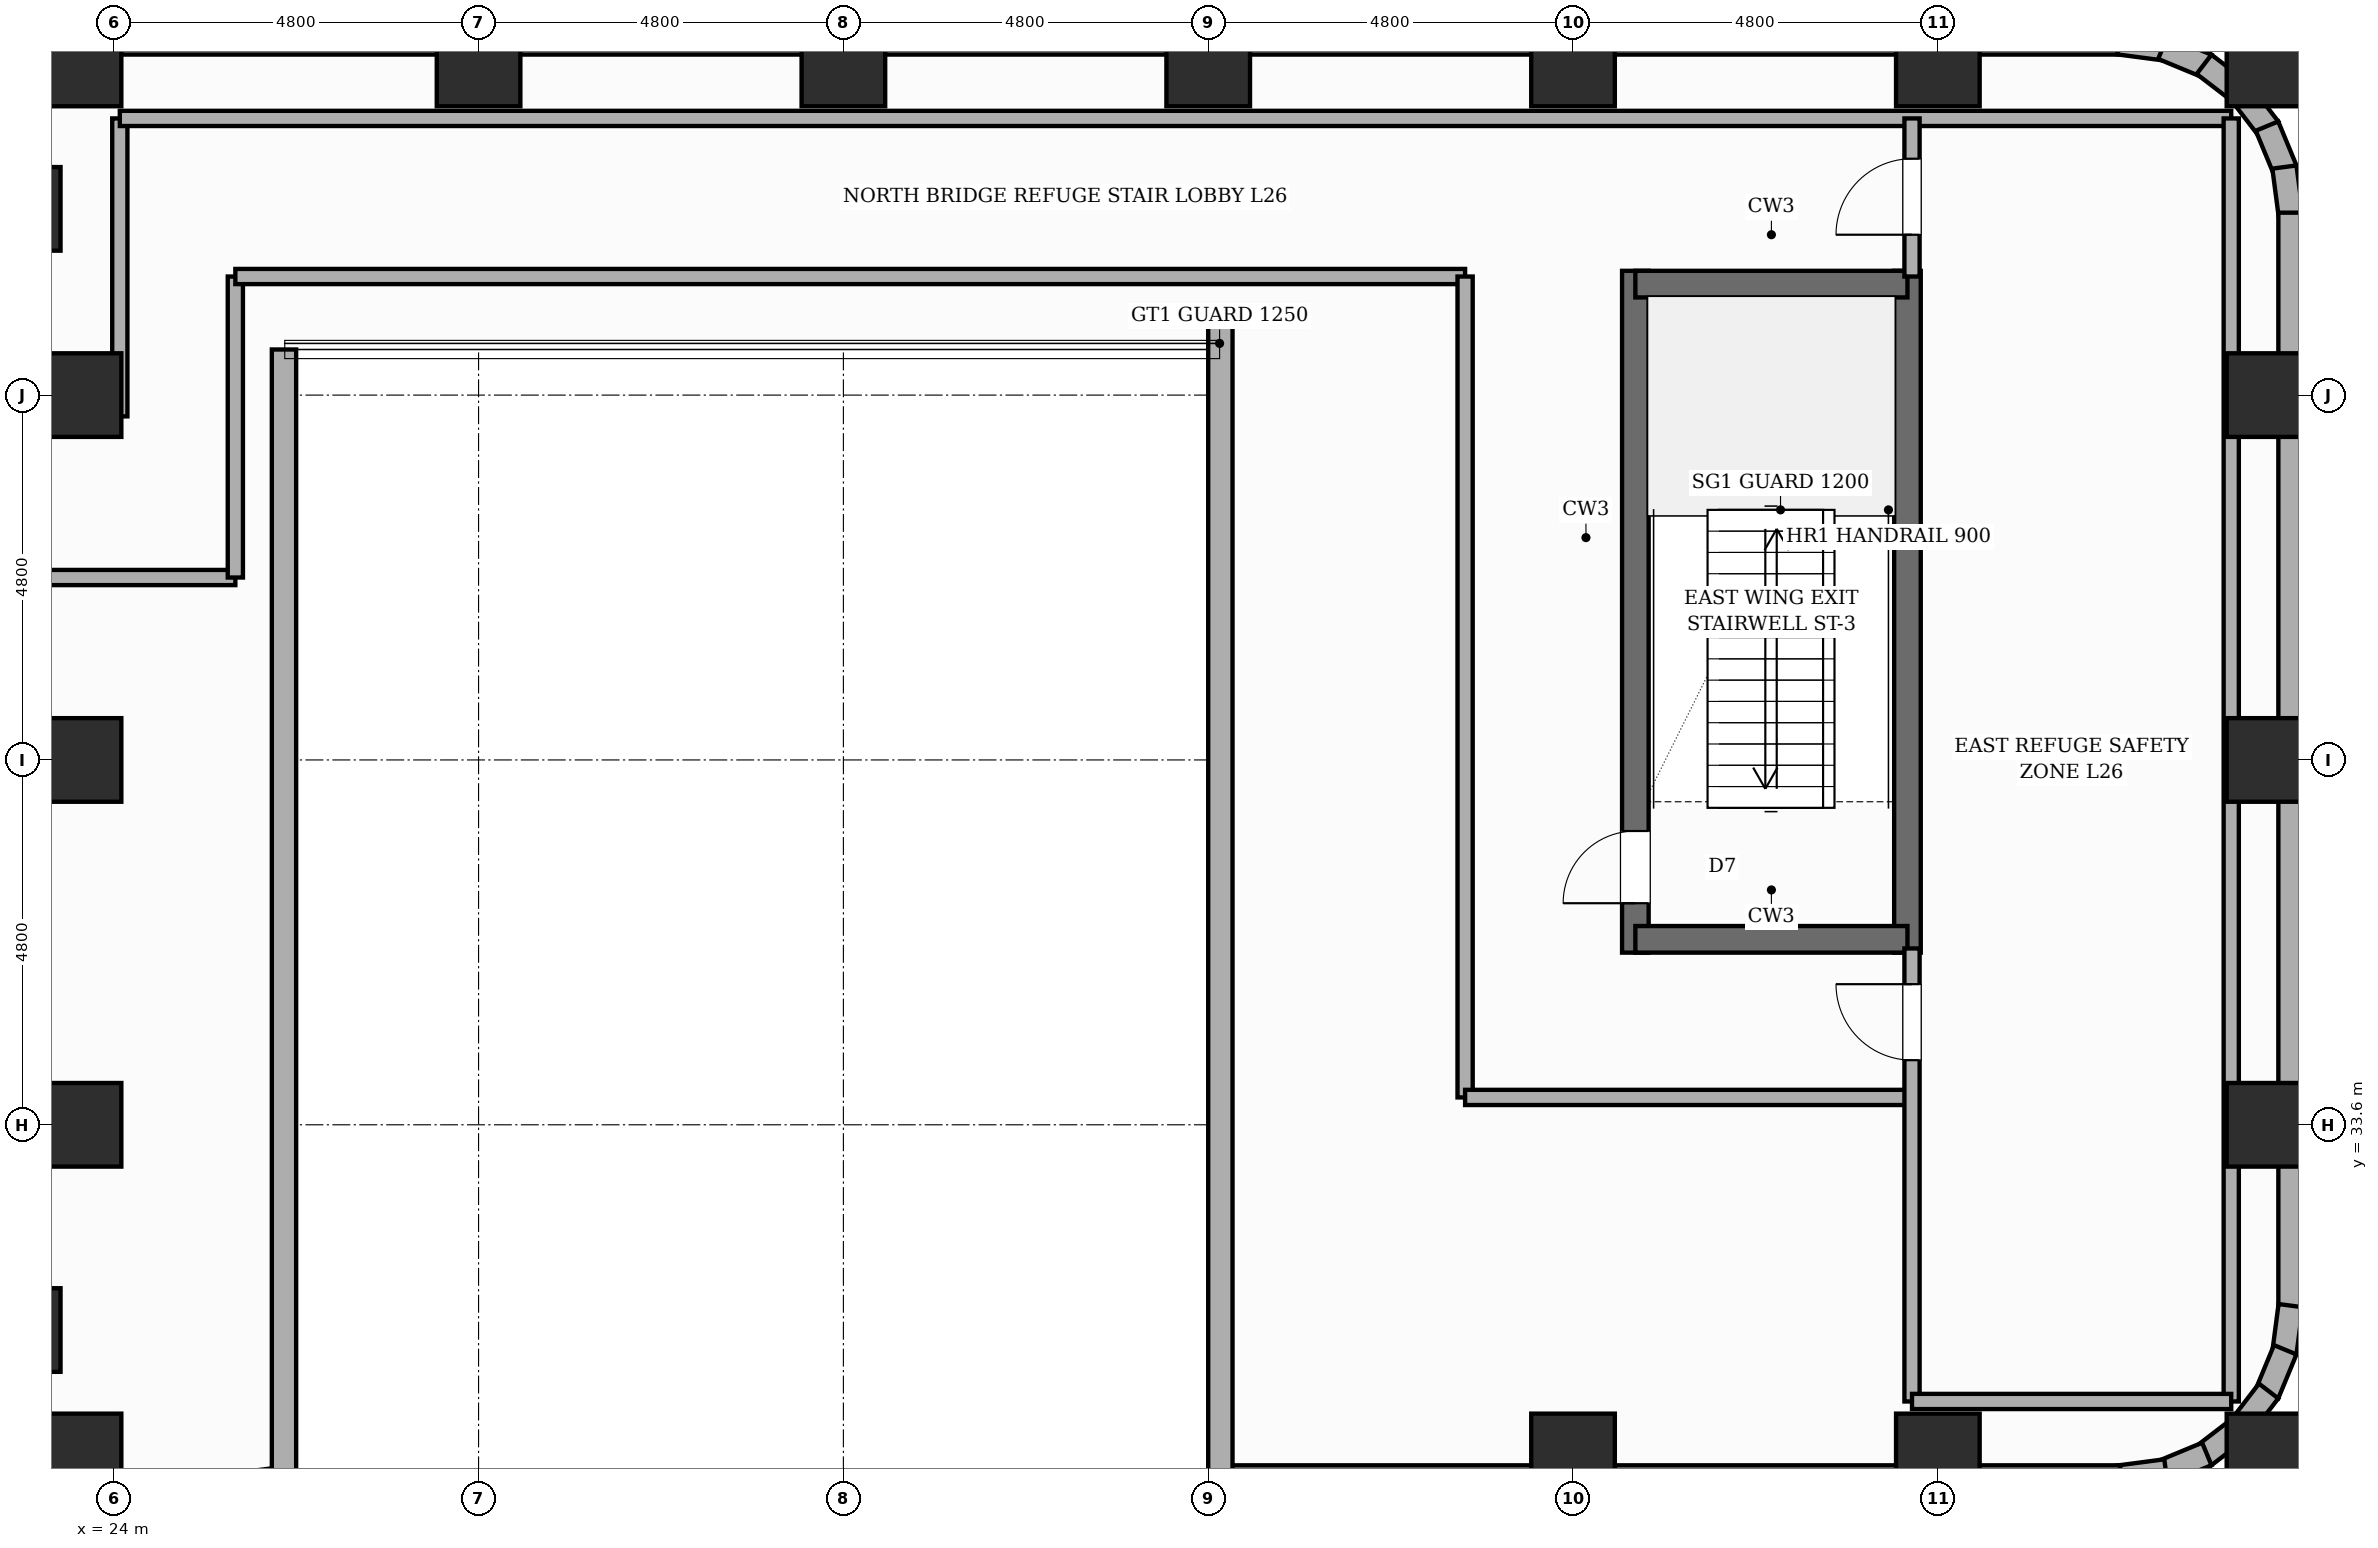
"""IFC4 building model, lengths in metres.
Left out: names, types, materials, properties, quantities, classifications, styles, units other than length and angle.
Written with IfcOpenShell. Run it as: python <this file> out.ifc"""

import sys

from ifc_helpers import new_model, si_unit, direction, frame, frame_2d, origin, origin_2d, place, context, subcontext, project, spatial, rectangle, extrude, element, fill, save


model = new_model("IFC4")
c1 = context("Model", 3, precision=1e-05, world=origin(), true_north=direction((0.0, 1.0)))
c2 = subcontext(c1, "Body", "Model", "MODEL_VIEW")
j1 = project(units=[si_unit("LENGTHUNIT", "METRE"), si_unit("PLANEANGLEUNIT", "RADIAN")], contexts=[c1])
p1 = place(None, origin())
s1 = spatial("IfcSite", under=j1, at=p1, CompositionType="ELEMENT")
p2 = place(p1, origin())
s2 = spatial("IfcBuilding", under=s1, at=p2, CompositionType="ELEMENT")
p3 = place(p2, frame((0.0, 0.0, 101.8)))
s3 = spatial("IfcBuildingStorey", under=s2, at=p3, CompositionType="ELEMENT", Elevation=101.8)
p4 = place(p3, frame((44.02, 35.865, 0.0), z_axis=(0.0, 0.0, 1.0), x_axis=(0.0, 1.0, 0.0)))
e1 = element("IfcWall", 1, at=p4, inside=s3, PredefinedType="SHEAR", context=c2, shape_type="SweptSolid", body=[
    extrude(rectangle(XDim=8.97, YDim=0.35, at=frame_2d((4.485, 0.0))), origin(), (0.0, 0.0, 1.0), 5.4),
])
p5 = place(p4, frame((0.65, 0.0, 0.0)))
e2 = element("IfcOpeningElement", 2, at=p5, cuts=e1, PredefinedType="OPENING", context=c2, shape_type="SweptSolid", body=[
    extrude(rectangle(XDim=0.95, YDim=2.1, at=frame_2d((0.475, 1.05))), frame((0.0, 0.185, 0.0), z_axis=(0.0, -1.0, 0.0), x_axis=(1.0, 0.0, 0.0)), (0.0, 0.0, 1.0), 0.37),
])
p6 = place(p3, frame((47.6, 35.865, 0.0), z_axis=(0.0, 0.0, 1.0), x_axis=(0.0, 1.0, 0.0)))
e3 = element("IfcWall", 3, at=p6, inside=s3, PredefinedType="SHEAR", context=c2, shape_type="SweptSolid", body=[
    extrude(rectangle(XDim=8.97, YDim=0.35, at=frame_2d((4.485, 0.0))), origin(), (0.0, 0.0, 1.0), 5.4),
])
for number, where, z_axis, x_axis in (
    (4, (44.02, 36.04, 0.0), (0.0, 0.0, 1.0), (1.0, 0.0, 0.0)),
    (5, (44.02, 44.66, 0.0), (0.0, 0.0, 1.0), (1.0, 0.0, 0.0)),
):
    element("IfcWall", number, at=place(p3, frame(where, z_axis=z_axis, x_axis=x_axis)), inside=s3, PredefinedType="SHEAR", context=c2, shape_type="SweptSolid", body=[
        extrude(rectangle(XDim=3.58, YDim=0.35, at=frame_2d((1.79, 0.0))), origin(), (0.0, 0.0, 1.0), 5.4),
    ])
for number, where, z_axis, x_axis in (
    (6, (22.75, 30.9, 0.0), (0.0, 0.0, 1.0), (1.0, 0.0, 0.0)),
    (7, (22.75, 45.65, 0.0), (0.0, 0.0, 1.0), (1.0, 0.0, 0.0)),
    (8, (23.55, 29.25, 0.0), (0.0, 0.0, 1.0), (1.0, 0.0, 0.0)),
    (9, (23.55, 33.6, 0.0), (0.0, 0.0, 1.0), (1.0, 0.0, 0.0)),
    (10, (23.55, 38.4, 0.0), (0.0, 0.0, 1.0), (1.0, 0.0, 0.0)),
    (11, (23.55, 43.2, 0.0), (0.0, 0.0, 1.0), (1.0, 0.0, 0.0)),
    (12, (23.55, 47.55, 0.0), (0.0, 0.0, 1.0), (1.0, 0.0, 0.0)),
    (13, (28.8, 47.55, 0.0), (0.0, 0.0, 1.0), (1.0, 0.0, 0.0)),
    (14, (33.6, 47.55, 0.0), (0.0, 0.0, 1.0), (1.0, 0.0, 0.0)),
    (15, (38.4, 47.55, 0.0), (0.0, 0.0, 1.0), (1.0, 0.0, 0.0)),
    (16, (43.2, 29.25, 0.0), (0.0, 0.0, 1.0), (1.0, 0.0, 0.0)),
    (17, (43.2, 47.55, 0.0), (0.0, 0.0, 1.0), (1.0, 0.0, 0.0)),
    (18, (48.0, 29.25, 0.0), (0.0, 0.0, 1.0), (1.0, 0.0, 0.0)),
    (19, (48.0, 47.55, 0.0), (0.0, 0.0, 1.0), (1.0, 0.0, 0.0)),
    (20, (52.35, 29.25, 0.0), (0.0, 0.0, 1.0), (1.0, 0.0, 0.0)),
    (21, (52.35, 33.6, 0.0), (0.0, 0.0, 1.0), (1.0, 0.0, 0.0)),
    (22, (52.35, 38.4, 0.0), (0.0, 0.0, 1.0), (1.0, 0.0, 0.0)),
    (23, (52.35, 43.2, 0.0), (0.0, 0.0, 1.0), (1.0, 0.0, 0.0)),
    (24, (52.35, 47.55, 0.0), (0.0, 0.0, 1.0), (1.0, 0.0, 0.0)),
):
    element("IfcColumn", number, at=place(p3, frame(where, z_axis=z_axis, x_axis=x_axis)), inside=s3, PredefinedType="COLUMN", context=c2, shape_type="SweptSolid", body=[
        extrude(rectangle(XDim=1.1, YDim=1.1, at=origin_2d()), origin(), (0.0, 0.0, 1.0), 5.4),
    ])
p7 = place(p3, frame((7.2, 47.84, 0.0), z_axis=(0.0, 0.0, 1.0), x_axis=(1.0, 0.0, 0.0)))
e25 = element("IfcWall", 25, at=p7, inside=s3, PredefinedType="STANDARD", context=c2, shape_type="SweptSolid", body=[
    extrude(rectangle(XDim=43.2, YDim=0.32, at=frame_2d((21.6, 0.0))), origin(), (0.0, 0.0, 1.0), 4.34),
])
for number, where, z_axis, x_axis in (
    (26, (50.379, 47.841, 0.0), (0.0, 0.0, 1.0), (0.991, -0.131, 0.0)),
    (27, (50.96, 47.771, 0.0), (0.0, 0.0, 1.0), (0.924, -0.383, 0.0)),
    (28, (51.503, 47.552, 0.0), (0.0, 0.0, 1.0), (0.793, -0.609, 0.0)),
    (29, (51.97, 47.2, 0.0), (0.0, 0.0, 1.0), (0.609, -0.793, 0.0)),
    (30, (52.331, 46.739, 0.0), (0.0, 0.0, 1.0), (0.382, -0.924, 0.0)),
    (31, (52.56, 46.2, 0.0), (0.0, 0.0, 1.0), (0.131, -0.991, 0.0)),
):
    element("IfcWall", number, at=place(p3, frame(where, z_axis=z_axis, x_axis=x_axis)), inside=s3, PredefinedType="STANDARD", context=c2, shape_type="SweptSolid", body=[
        extrude(rectangle(XDim=0.626, YDim=0.32, at=frame_2d((0.313, 0.0))), origin(), (0.0, 0.0, 1.0), 4.34),
    ])
p8 = place(p3, frame((52.64, 45.6, 0.0), z_axis=(0.0, 0.0, 1.0), x_axis=(0.0, -1.0, 0.0)))
e32 = element("IfcWall", 32, at=p8, inside=s3, PredefinedType="STANDARD", context=c2, shape_type="SweptSolid", body=[
    extrude(rectangle(XDim=14.4, YDim=0.32, at=frame_2d((7.2, 0.0))), origin(), (0.0, 0.0, 1.0), 4.34),
])
p9 = place(p3, frame((52.641, 31.221, 0.0), z_axis=(0.0, 0.0, 1.0), x_axis=(-0.130504898859, -0.991447664465, 0.0)))
e33 = element("IfcWall", 33, at=p9, inside=s3, PredefinedType="STANDARD", context=c2, shape_type="SweptSolid", body=[
    extrude(rectangle(XDim=0.627, YDim=0.32, at=frame_2d((0.313, 0.0))), origin(), (0.0, 0.0, 1.0), 4.34),
])
p10 = place(p3, frame((52.57, 30.64, 0.0), z_axis=(0.0, 0.0, 1.0), x_axis=(-0.382455093999, -0.923974080304, 0.0)))
e34 = element("IfcWall", 34, at=p10, inside=s3, PredefinedType="STANDARD", context=c2, shape_type="SweptSolid", body=[
    extrude(rectangle(XDim=0.626, YDim=0.32, at=frame_2d((0.313, 0.0))), origin(), (0.0, 0.0, 1.0), 4.34),
])
p11 = place(p3, frame((52.352, 30.097, 0.0), z_axis=(0.0, 0.0, 1.0), x_axis=(-0.608693302629, -0.793405610854, 0.0)))
e35 = element("IfcWall", 35, at=p11, inside=s3, PredefinedType="STANDARD", context=c2, shape_type="SweptSolid", body=[
    extrude(rectangle(XDim=0.626, YDim=0.32, at=frame_2d((0.313, 0.0))), origin(), (0.0, 0.0, 1.0), 4.34),
])
p12 = place(p3, frame((52.0, 29.63, 0.0), z_axis=(0.0, 0.0, 1.0), x_axis=(-0.7932174212, -0.608938521285, 0.0)))
e36 = element("IfcWall", 36, at=p12, inside=s3, PredefinedType="STANDARD", context=c2, shape_type="SweptSolid", body=[
    extrude(rectangle(XDim=0.627, YDim=0.32, at=frame_2d((0.313, 0.0))), origin(), (0.0, 0.0, 1.0), 4.34),
])
for number, where, z_axis, x_axis in (
    (37, (51.539, 29.269, 0.0), (0.0, 0.0, 1.0), (-0.924, -0.383, 0.0)),
    (38, (51.0, 29.04, 0.0), (0.0, 0.0, 1.0), (-0.991, -0.131, 0.0)),
):
    element("IfcWall", number, at=place(p3, frame(where, z_axis=z_axis, x_axis=x_axis)), inside=s3, PredefinedType="STANDARD", context=c2, shape_type="SweptSolid", body=[
        extrude(rectangle(XDim=0.626, YDim=0.32, at=frame_2d((0.313, 0.0))), origin(), (0.0, 0.0, 1.0), 4.34),
    ])
p13 = place(p3, frame((50.4, 28.96, 0.0), z_axis=(0.0, 0.0, 1.0), x_axis=(-1.0, 0.0, 0.0)))
e39 = element("IfcWall", 39, at=p13, inside=s3, PredefinedType="STANDARD", context=c2, shape_type="SweptSolid", body=[
    extrude(rectangle(XDim=12.0, YDim=0.32, at=frame_2d((6.0, 0.0))), origin(), (0.0, 0.0, 1.0), 4.34),
])
p14 = place(p3, frame((38.56, 28.8, 0.0), z_axis=(0.0, 0.0, 1.0), x_axis=(0.0, 1.0, 0.0)))
e40 = element("IfcWall", 40, at=p14, inside=s3, PredefinedType="STANDARD", context=c2, shape_type="SweptSolid", body=[
    extrude(rectangle(XDim=15.32, YDim=0.32, at=frame_2d((7.66, 0.0))), origin(), (0.0, 0.0, 1.0), 5.16),
])
p15 = place(p3, frame((26.24, 43.8, 0.0), z_axis=(0.0, 0.0, 1.0), x_axis=(0.0, -1.0, 0.0)))
e41 = element("IfcWall", 41, at=p15, inside=s3, PredefinedType="STANDARD", context=c2, shape_type="SweptSolid", body=[
    extrude(rectangle(XDim=15.0, YDim=0.32, at=frame_2d((7.5, 0.0))), origin(), (0.0, 0.0, 1.0), 5.16),
])
p16 = place(p3, frame((22.75, 40.8, 0.0), z_axis=(0.0, 0.0, 1.0), x_axis=(1.0, 0.0, 0.0)))
e42 = element("IfcWall", 42, at=p16, inside=s3, PredefinedType="PARTITIONING", context=c2, shape_type="SweptSolid", body=[
    extrude(rectangle(XDim=2.85, YDim=0.2, at=frame_2d((1.425, 0.0))), origin(), (0.0, 0.0, 1.0), 5.16),
])
p17 = place(p3, frame((22.75, 42.92, 0.0), z_axis=(0.0, 0.0, 1.0), x_axis=(1.0, 0.0, 0.0)))
e43 = element("IfcWall", 43, at=p17, inside=s3, PredefinedType="PARTITIONING", context=c2, shape_type="SweptSolid", body=[
    extrude(rectangle(XDim=1.33, YDim=0.2, at=frame_2d((0.665, 0.0))), origin(), (0.0, 0.0, 1.0), 4.34),
])
p18 = place(p3, frame((24.08, 42.92, 0.0), z_axis=(0.0, 0.0, 1.0), x_axis=(0.0, 1.0, 0.0)))
e44 = element("IfcWall", 44, at=p18, inside=s3, PredefinedType="PARTITIONING", context=c2, shape_type="SweptSolid", body=[
    extrude(rectangle(XDim=3.92, YDim=0.2, at=frame_2d((1.96, 0.0))), origin(), (0.0, 0.0, 1.0), 5.16),
])
p19 = place(p3, frame((25.6, 40.8, 0.0), z_axis=(0.0, 0.0, 1.0), x_axis=(0.0, 1.0, 0.0)))
e45 = element("IfcWall", 45, at=p19, inside=s3, PredefinedType="PARTITIONING", context=c2, shape_type="SweptSolid", body=[
    extrude(rectangle(XDim=3.96, YDim=0.2, at=frame_2d((1.98, 0.0))), origin(), (0.0, 0.0, 1.0), 5.16),
])
p20 = place(p3, frame((24.08, 46.84, 0.0), z_axis=(0.0, 0.0, 1.0), x_axis=(1.0, 0.0, 0.0)))
e46 = element("IfcWall", 46, at=p20, inside=s3, PredefinedType="PARTITIONING", context=c2, shape_type="SweptSolid", body=[
    extrude(rectangle(XDim=27.78, YDim=0.2, at=frame_2d((13.89, 0.0))), origin(), (0.0, 0.0, 1.0), 5.16),
])
p21 = place(p3, frame((25.6, 44.76, 0.0), z_axis=(0.0, 0.0, 1.0), x_axis=(1.0, 0.0, 0.0)))
e47 = element("IfcWall", 47, at=p21, inside=s3, PredefinedType="PARTITIONING", context=c2, shape_type="SweptSolid", body=[
    extrude(rectangle(XDim=16.18, YDim=0.2, at=frame_2d((8.09, 0.0))), origin(), (0.0, 0.0, 1.0), 5.16),
])
p22 = place(p3, frame((41.78, 33.96, 0.0), z_axis=(0.0, 0.0, 1.0), x_axis=(0.0, 1.0, 0.0)))
e48 = element("IfcWall", 48, at=p22, inside=s3, PredefinedType="PARTITIONING", context=c2, shape_type="SweptSolid", body=[
    extrude(rectangle(XDim=10.8, YDim=0.2, at=frame_2d((5.4, 0.0))), origin(), (0.0, 0.0, 1.0), 5.16),
])
p23 = place(p3, frame((41.78, 33.96, 0.0), z_axis=(0.0, 0.0, 1.0), x_axis=(1.0, 0.0, 0.0)))
e49 = element("IfcWall", 49, at=p23, inside=s3, PredefinedType="PARTITIONING", context=c2, shape_type="SweptSolid", body=[
    extrude(rectangle(XDim=5.88, YDim=0.2, at=frame_2d((2.94, 0.0))), origin(), (0.0, 0.0, 1.0), 5.16),
])
p24 = place(p3, frame((47.66, 44.76, 0.0), z_axis=(0.0, 0.0, 1.0), x_axis=(0.0, 1.0, 0.0)))
e50 = element("IfcWall", 50, at=p24, inside=s3, PredefinedType="PARTITIONING", context=c2, shape_type="SweptSolid", body=[
    extrude(rectangle(XDim=2.08, YDim=0.2, at=frame_2d((1.04, 0.0))), origin(), (0.0, 0.0, 1.0), 5.16),
])
p25 = place(p24, frame((0.55, 0.0, 0.0)))
e51 = element("IfcOpeningElement", 51, at=p25, cuts=e50, PredefinedType="OPENING", context=c2, shape_type="SweptSolid", body=[
    extrude(rectangle(XDim=1.0, YDim=2.15, at=frame_2d((0.5, 1.075))), frame((0.0, 0.11, 0.0), z_axis=(0.0, -1.0, 0.0), x_axis=(1.0, 0.0, 0.0)), (0.0, 0.0, 1.0), 0.22),
])
p26 = place(p3, frame((47.66, 29.96, 0.0), z_axis=(0.0, 0.0, 1.0), x_axis=(0.0, 1.0, 0.0)))
e52 = element("IfcWall", 52, at=p26, inside=s3, PredefinedType="PARTITIONING", context=c2, shape_type="SweptSolid", body=[
    extrude(rectangle(XDim=5.96, YDim=0.2, at=frame_2d((2.98, 0.0))), origin(), (0.0, 0.0, 1.0), 5.16),
])
p27 = place(p26, frame((4.49, 0.0, 0.0)))
e53 = element("IfcOpeningElement", 53, at=p27, cuts=e52, PredefinedType="OPENING", context=c2, shape_type="SweptSolid", body=[
    extrude(rectangle(XDim=1.0, YDim=2.15, at=frame_2d((0.5, 1.075))), frame((0.0, 0.11, 0.0), z_axis=(0.0, -1.0, 0.0), x_axis=(1.0, 0.0, 0.0)), (0.0, 0.0, 1.0), 0.22),
])
p28 = place(p3, frame((51.86, 29.96, 0.0), z_axis=(0.0, 0.0, 1.0), x_axis=(0.0, 1.0, 0.0)))
e54 = element("IfcWall", 54, at=p28, inside=s3, PredefinedType="PARTITIONING", context=c2, shape_type="SweptSolid", body=[
    extrude(rectangle(XDim=16.88, YDim=0.2, at=frame_2d((8.44, 0.0))), origin(), (0.0, 0.0, 1.0), 5.16),
])
p29 = place(p3, frame((47.66, 29.96, 0.0), z_axis=(0.0, 0.0, 1.0), x_axis=(1.0, 0.0, 0.0)))
e55 = element("IfcWall", 55, at=p29, inside=s3, PredefinedType="PARTITIONING", context=c2, shape_type="SweptSolid", body=[
    extrude(rectangle(XDim=4.2, YDim=0.2, at=frame_2d((2.1, 0.0))), origin(), (0.0, 0.0, 1.0), 5.16),
])
p30 = place(p5, origin())
e56 = element("IfcDoor", 56, at=p30, inside=s3, OperationType="SINGLE_SWING_LEFT", PredefinedType="DOOR", context=c2, shape_type="SweptSolid", body=[
    extrude(rectangle(XDim=0.95, YDim=2.1, at=frame_2d((0.475, 1.05))), frame((0.0, 0.025, 0.0), z_axis=(0.0, -1.0, 0.0), x_axis=(1.0, 0.0, 0.0)), (0.0, 0.0, 1.0), 0.05),
])
fill(e2, e56)
p31 = place(p25, origin())
e57 = element("IfcDoor", 57, at=p31, inside=s3, OperationType="SINGLE_SWING_LEFT", PredefinedType="DOOR", context=c2, shape_type="SweptSolid", body=[
    extrude(rectangle(XDim=1.0, YDim=2.15, at=frame_2d((0.5, 1.075))), frame((0.0, 0.025, 0.0), z_axis=(0.0, -1.0, 0.0), x_axis=(1.0, 0.0, 0.0)), (0.0, 0.0, 1.0), 0.05),
])
fill(e51, e57)
p32 = place(p27, origin())
e58 = element("IfcDoor", 58, at=p32, inside=s3, OperationType="SINGLE_SWING_RIGHT", PredefinedType="DOOR", context=c2, shape_type="SweptSolid", body=[
    extrude(rectangle(XDim=1.0, YDim=2.15, at=frame_2d((0.5, 1.075))), frame((0.0, 0.025, 0.0), z_axis=(0.0, -1.0, 0.0), x_axis=(1.0, 0.0, 0.0)), (0.0, 0.0, 1.0), 0.05),
])
fill(e53, e58)
save(model, sys.argv[1])
